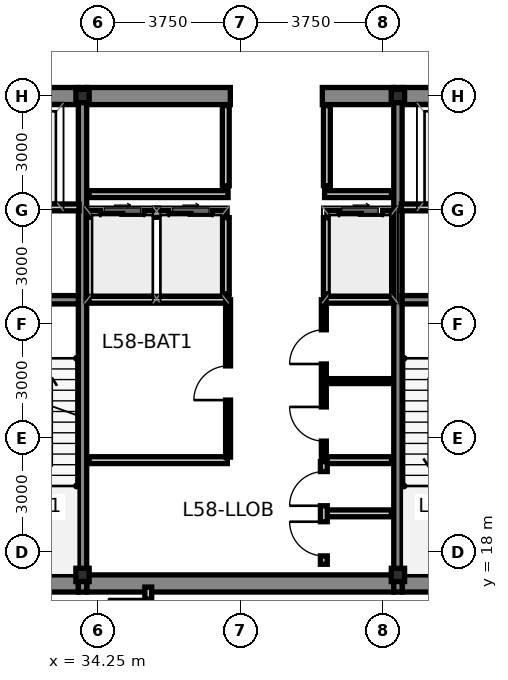
"""IFC4 building model, lengths in metres.
Left out: names, types, materials, properties, quantities, classifications, styles, units other than length and angle.
Written with IfcOpenShell. Run it as: python <this file> out.ifc"""

import sys

from ifc_helpers import new_model, si_unit, direction, frame, frame_2d, origin, origin_2d, place, context, subcontext, project, spatial, rectangle, hollow_rectangle, extrude, source, transform, mapped, element, fill, save


model = new_model("IFC4")
c1 = context("Model", 3, precision=1e-05, world=origin(), true_north=direction((0.0, 1.0)))
c2 = subcontext(c1, "Body", "Model", "MODEL_VIEW")
j1 = project(units=[si_unit("LENGTHUNIT", "METRE"), si_unit("PLANEANGLEUNIT", "RADIAN")], contexts=[c1])
p1 = place(None, origin())
s1 = spatial("IfcSite", under=j1, at=p1, CompositionType="ELEMENT")
p2 = place(p1, origin())
s2 = spatial("IfcBuilding", under=s1, at=p2, CompositionType="ELEMENT")
p3 = place(p2, frame((0.0, 0.0, 220.55)))
s3 = spatial("IfcBuildingStorey", under=s2, at=p3, CompositionType="ELEMENT", Elevation=220.55)
m1 = source(origin(), c2, "Body", "SweptSolid", [
    extrude(hollow_rectangle(XDim=0.35, YDim=0.35, WallThickness=0.016, at=origin_2d()), origin(), (0.0, 0.0, 1.0), 4.8),
])
for number, where, z_axis, x_axis in (
    (1, (33.85, 17.4, 0.0), (0.0, 0.0, 1.0), (1.0, 0.0, 0.0)),
    (2, (42.15, 17.4, 0.0), (0.0, 0.0, 1.0), (1.0, 0.0, 0.0)),
    (3, (33.85, 30.0, 0.0), (0.0, 0.0, 1.0), (1.0, 0.0, 0.0)),
    (4, (42.15, 30.0, 0.0), (0.0, 0.0, 1.0), (1.0, 0.0, 0.0)),
):
    element("IfcColumn", number, at=place(p3, frame(where, z_axis=z_axis, x_axis=x_axis)), inside=s3, PredefinedType="COLUMN", context=c2, shape_type="MappedRepresentation", body=[
        mapped(m1, transform((0.0, 0.0, 0.0), scale=1.0)),
    ])
p4 = place(p3, frame((30.84, 17.175, 0.0), z_axis=(0.0, 0.0, 1.0), x_axis=(1.0, 0.0, 0.0)))
e5 = element("IfcWall", 5, at=p4, inside=s3, PredefinedType="SHEAR", context=c2, shape_type="SweptSolid", body=[
    extrude(rectangle(XDim=2.9, YDim=0.45, at=frame_2d((1.45, 0.0))), origin(), (0.0, 0.0, 1.0), 4.8),
])
p5 = place(p3, frame((33.96, 17.175, 0.0), z_axis=(0.0, 0.0, 1.0), x_axis=(1.0, 0.0, 0.0)))
e6 = element("IfcWall", 6, at=p5, inside=s3, PredefinedType="SHEAR", context=c2, shape_type="SweptSolid", body=[
    extrude(rectangle(XDim=8.08, YDim=0.45, at=frame_2d((4.04, 0.0))), origin(), (0.0, 0.0, 1.0), 4.8),
])
for number, where, z_axis, x_axis in (
    (7, (42.26, 17.175, 0.0), (0.0, 0.0, 1.0), (1.0, 0.0, 0.0)),
    (8, (30.84, 30.0, 0.0), (0.0, 0.0, 1.0), (1.0, 0.0, 0.0)),
):
    element("IfcWall", number, at=place(p3, frame(where, z_axis=z_axis, x_axis=x_axis)), inside=s3, PredefinedType="SHEAR", context=c2, shape_type="SweptSolid", body=[
        extrude(rectangle(XDim=2.9, YDim=0.45, at=frame_2d((1.45, 0.0))), origin(), (0.0, 0.0, 1.0), 4.8),
    ])
p6 = place(p3, frame((33.96, 30.0, 0.0), z_axis=(0.0, 0.0, 1.0), x_axis=(1.0, 0.0, 0.0)))
e9 = element("IfcWall", 9, at=p6, inside=s3, PredefinedType="SHEAR", context=c2, shape_type="SweptSolid", body=[
    extrude(rectangle(XDim=3.78, YDim=0.45, at=frame_2d((1.89, 0.0))), origin(), (0.0, 0.0, 1.0), 4.8),
])
p7 = place(p3, frame((40.16, 30.0, 0.0), z_axis=(0.0, 0.0, 1.0), x_axis=(1.0, 0.0, 0.0)))
e10 = element("IfcWall", 10, at=p7, inside=s3, PredefinedType="SHEAR", context=c2, shape_type="SweptSolid", body=[
    extrude(rectangle(XDim=1.88, YDim=0.45, at=frame_2d((0.94, 0.0))), origin(), (0.0, 0.0, 1.0), 4.8),
])
p8 = place(p3, frame((42.26, 30.0, 0.0), z_axis=(0.0, 0.0, 1.0), x_axis=(1.0, 0.0, 0.0)))
e11 = element("IfcWall", 11, at=p8, inside=s3, PredefinedType="SHEAR", context=c2, shape_type="SweptSolid", body=[
    extrude(rectangle(XDim=2.9, YDim=0.45, at=frame_2d((1.45, 0.0))), origin(), (0.0, 0.0, 1.0), 4.8),
])
for number, where, z_axis, x_axis in (
    (12, (33.85, 16.95, 0.0), (0.0, 0.0, 1.0), (0.0, 1.0, 0.0)),
    (13, (42.15, 16.95, 0.0), (0.0, 0.0, 1.0), (0.0, 1.0, 0.0)),
):
    element("IfcWall", number, at=place(p3, frame(where, z_axis=z_axis, x_axis=x_axis)), inside=s3, PredefinedType="SHEAR", context=c2, shape_type="SweptSolid", body=[
        extrude(rectangle(XDim=13.275, YDim=0.22, at=frame_2d((6.638, 0.0))), origin(), (0.0, 0.0, 1.0), 4.8),
    ])
for number, where, z_axis, x_axis in (
    (14, (30.84, 24.64, 0.0), (0.0, 0.0, 1.0), (1.0, 0.0, 0.0)),
    (15, (42.26, 24.64, 0.0), (0.0, 0.0, 1.0), (1.0, 0.0, 0.0)),
):
    element("IfcWall", number, at=place(p3, frame(where, z_axis=z_axis, x_axis=x_axis)), inside=s3, PredefinedType="SHEAR", context=c2, shape_type="SweptSolid", body=[
        extrude(rectangle(XDim=2.9, YDim=0.22, at=frame_2d((1.45, 0.0))), origin(), (0.0, 0.0, 1.0), 4.8),
    ])
p9 = place(p3, frame((34.02, 26.9, 0.0), z_axis=(0.0, 0.0, 1.0), x_axis=(1.0, 0.0, 0.0)))
e16 = element("IfcWall", 16, at=p9, inside=s3, PredefinedType="PARTITIONING", context=c2, shape_type="SweptSolid", body=[
    extrude(rectangle(XDim=3.6, YDim=0.18, at=frame_2d((1.8, 0.0))), origin(), (0.0, 0.0, 1.0), 4.55),
])
p10 = place(p9, frame((0.3, 0.0, 0.0)))
e17 = element("IfcOpeningElement", 17, at=p10, cuts=e16, PredefinedType="OPENING", context=c2, shape_type="SweptSolid", body=[
    extrude(rectangle(XDim=1.15, YDim=2.2, at=frame_2d((0.575, 1.1))), frame((0.0, 0.102, 0.0), z_axis=(0.0, -1.0, 0.0), x_axis=(1.0, 0.0, 0.0)), (0.0, 0.0, 1.0), 0.204),
])
p11 = place(p9, frame((2.1, 0.0, 0.0)))
e18 = element("IfcOpeningElement", 18, at=p11, cuts=e16, PredefinedType="OPENING", context=c2, shape_type="SweptSolid", body=[
    extrude(rectangle(XDim=1.15, YDim=2.2, at=frame_2d((0.575, 1.1))), frame((0.0, 0.102, 0.0), z_axis=(0.0, -1.0, 0.0), x_axis=(1.0, 0.0, 0.0)), (0.0, 0.0, 1.0), 0.204),
])
p12 = place(p3, frame((40.28, 26.9, 0.0), z_axis=(0.0, 0.0, 1.0), x_axis=(1.0, 0.0, 0.0)))
e19 = element("IfcWall", 19, at=p12, inside=s3, PredefinedType="PARTITIONING", context=c2, shape_type="SweptSolid", body=[
    extrude(rectangle(XDim=1.7, YDim=0.18, at=frame_2d((0.85, 0.0))), origin(), (0.0, 0.0, 1.0), 4.55),
])
p13 = place(p12, frame((0.32, 0.0, 0.0)))
e20 = element("IfcOpeningElement", 20, at=p13, cuts=e19, PredefinedType="OPENING", context=c2, shape_type="SweptSolid", body=[
    extrude(rectangle(XDim=1.15, YDim=2.2, at=frame_2d((0.575, 1.1))), frame((0.0, 0.102, 0.0), z_axis=(0.0, -1.0, 0.0), x_axis=(1.0, 0.0, 0.0)), (0.0, 0.0, 1.0), 0.204),
])
for number, where, z_axis, x_axis in (
    (21, (37.62, 24.8, 0.0), (0.0, 0.0, 1.0), (0.0, 1.0, 0.0)),
    (22, (40.28, 24.8, 0.0), (0.0, 0.0, 1.0), (0.0, 1.0, 0.0)),
):
    element("IfcWall", number, at=place(p3, frame(where, z_axis=z_axis, x_axis=x_axis)), inside=s3, PredefinedType="PARTITIONING", context=c2, shape_type="SweptSolid", body=[
        extrude(rectangle(XDim=2.0, YDim=0.18, at=frame_2d((1.0, 0.0))), origin(), (0.0, 0.0, 1.0), 4.55),
    ])
p14 = place(p3, frame((34.02, 24.64, 0.0), z_axis=(0.0, 0.0, 1.0), x_axis=(1.0, 0.0, 0.0)))
e23 = element("IfcWall", 23, at=p14, inside=s3, PredefinedType="PARTITIONING", context=c2, shape_type="SweptSolid", body=[
    extrude(rectangle(XDim=3.68, YDim=0.18, at=frame_2d((1.84, 0.0))), origin(), (0.0, 0.0, 1.0), 4.55),
])
p15 = place(p3, frame((40.2, 24.64, 0.0), z_axis=(0.0, 0.0, 1.0), x_axis=(1.0, 0.0, 0.0)))
e24 = element("IfcWall", 24, at=p15, inside=s3, PredefinedType="PARTITIONING", context=c2, shape_type="SweptSolid", body=[
    extrude(rectangle(XDim=1.78, YDim=0.18, at=frame_2d((0.89, 0.0))), origin(), (0.0, 0.0, 1.0), 4.55),
])
p16 = place(p3, frame((34.02, 27.42, 0.0), z_axis=(0.0, 0.0, 1.0), x_axis=(1.0, 0.0, 0.0)))
e25 = element("IfcWall", 25, at=p16, inside=s3, PredefinedType="PARTITIONING", context=c2, shape_type="SweptSolid", body=[
    extrude(rectangle(XDim=3.66, YDim=0.18, at=frame_2d((1.83, 0.0))), origin(), (0.0, 0.0, 1.0), 4.55),
])
p17 = place(p3, frame((40.22, 27.42, 0.0), z_axis=(0.0, 0.0, 1.0), x_axis=(1.0, 0.0, 0.0)))
e26 = element("IfcWall", 26, at=p17, inside=s3, PredefinedType="PARTITIONING", context=c2, shape_type="SweptSolid", body=[
    extrude(rectangle(XDim=1.76, YDim=0.18, at=frame_2d((0.88, 0.0))), origin(), (0.0, 0.0, 1.0), 4.55),
])
for number, where, z_axis, x_axis in (
    (27, (37.62, 27.64, 0.0), (0.0, 0.0, 1.0), (0.0, 1.0, 0.0)),
    (28, (40.28, 27.64, 0.0), (0.0, 0.0, 1.0), (0.0, 1.0, 0.0)),
):
    element("IfcWall", number, at=place(p3, frame(where, z_axis=z_axis, x_axis=x_axis)), inside=s3, PredefinedType="PARTITIONING", context=c2, shape_type="SweptSolid", body=[
        extrude(rectangle(XDim=2.11, YDim=0.18, at=frame_2d((1.055, 0.0))), origin(), (0.0, 0.0, 1.0), 4.55),
    ])
for number, where, z_axis, x_axis in (
    (29, (30.86, 27.07, 0.0), (0.0, 0.0, 1.0), (1.0, 0.0, 0.0)),
    (30, (42.24, 27.07, 0.0), (0.0, 0.0, 1.0), (1.0, 0.0, 0.0)),
):
    element("IfcWall", number, at=place(p3, frame(where, z_axis=z_axis, x_axis=x_axis)), inside=s3, PredefinedType="PARTITIONING", context=c2, shape_type="SweptSolid", body=[
        extrude(rectangle(XDim=2.9, YDim=0.18, at=frame_2d((1.45, 0.0))), origin(), (0.0, 0.0, 1.0), 4.55),
    ])
p18 = place(p3, frame((34.02, 20.42, 0.0), z_axis=(0.0, 0.0, 1.0), x_axis=(1.0, 0.0, 0.0)))
e31 = element("IfcWall", 31, at=p18, inside=s3, PredefinedType="PARTITIONING", context=c2, shape_type="SweptSolid", body=[
    extrude(rectangle(XDim=3.64, YDim=0.18, at=frame_2d((1.82, 0.0))), origin(), (0.0, 0.0, 1.0), 4.55),
])
p19 = place(p3, frame((40.22, 20.42, 0.0), z_axis=(0.0, 0.0, 1.0), x_axis=(1.0, 0.0, 0.0)))
e32 = element("IfcWall", 32, at=p19, inside=s3, PredefinedType="PARTITIONING", context=c2, shape_type="SweptSolid", body=[
    extrude(rectangle(XDim=1.76, YDim=0.18, at=frame_2d((0.88, 0.0))), origin(), (0.0, 0.0, 1.0), 4.55),
])
p20 = place(p3, frame((40.28, 22.5, 0.0), z_axis=(0.0, 0.0, 1.0), x_axis=(1.0, 0.0, 0.0)))
e33 = element("IfcWall", 33, at=p20, inside=s3, PredefinedType="PARTITIONING", context=c2, shape_type="SweptSolid", body=[
    extrude(rectangle(XDim=1.7, YDim=0.13, at=frame_2d((0.85, 0.0))), origin(), (0.0, 0.0, 1.0), 4.55),
])
p21 = place(p3, frame((37.68, 20.5, 0.0), z_axis=(0.0, 0.0, 1.0), x_axis=(0.0, 1.0, 0.0)))
e34 = element("IfcWall", 34, at=p21, inside=s3, PredefinedType="PARTITIONING", context=c2, shape_type="SweptSolid", body=[
    extrude(rectangle(XDim=4.14, YDim=0.13, at=frame_2d((2.07, 0.0))), origin(), (0.0, 0.0, 1.0), 4.55),
])
p22 = place(p21, frame((1.5, 0.0, 0.0)))
e35 = element("IfcOpeningElement", 35, at=p22, cuts=e34, PredefinedType="OPENING", context=c2, shape_type="SweptSolid", body=[
    extrude(rectangle(XDim=0.9, YDim=2.1, at=frame_2d((0.45, 1.05))), frame((0.0, 0.077, 0.0), z_axis=(0.0, -1.0, 0.0), x_axis=(1.0, 0.0, 0.0)), (0.0, 0.0, 1.0), 0.154),
])
p23 = place(p3, frame((40.2, 20.5, 0.0), z_axis=(0.0, 0.0, 1.0), x_axis=(0.0, 1.0, 0.0)))
e36 = element("IfcWall", 36, at=p23, inside=s3, PredefinedType="PARTITIONING", context=c2, shape_type="SweptSolid", body=[
    extrude(rectangle(XDim=4.14, YDim=0.13, at=frame_2d((2.07, 0.0))), origin(), (0.0, 0.0, 1.0), 4.55),
])
p24 = place(p23, frame((0.42, 0.0, 0.0)))
e37 = element("IfcOpeningElement", 37, at=p24, cuts=e36, PredefinedType="OPENING", context=c2, shape_type="SweptSolid", body=[
    extrude(rectangle(XDim=0.9, YDim=2.1, at=frame_2d((0.45, 1.05))), frame((0.0, 0.077, 0.0), z_axis=(0.0, -1.0, 0.0), x_axis=(1.0, 0.0, 0.0)), (0.0, 0.0, 1.0), 0.154),
])
p25 = place(p23, frame((2.45, 0.0, 0.0)))
e38 = element("IfcOpeningElement", 38, at=p25, cuts=e36, PredefinedType="OPENING", context=c2, shape_type="SweptSolid", body=[
    extrude(rectangle(XDim=0.9, YDim=2.1, at=frame_2d((0.45, 1.05))), frame((0.0, 0.077, 0.0), z_axis=(0.0, -1.0, 0.0), x_axis=(1.0, 0.0, 0.0)), (0.0, 0.0, 1.0), 0.154),
])
p26 = place(p3, frame((40.28, 19.02, 0.0), z_axis=(0.0, 0.0, 1.0), x_axis=(1.0, 0.0, 0.0)))
e39 = element("IfcWall", 39, at=p26, inside=s3, PredefinedType="PARTITIONING", context=c2, shape_type="SweptSolid", body=[
    extrude(rectangle(XDim=1.7, YDim=0.18, at=frame_2d((0.85, 0.0))), origin(), (0.0, 0.0, 1.0), 4.55),
])
p27 = place(p3, frame((40.2, 17.68, 0.0), z_axis=(0.0, 0.0, 1.0), x_axis=(0.0, 1.0, 0.0)))
e40 = element("IfcWall", 40, at=p27, inside=s3, PredefinedType="PARTITIONING", context=c2, shape_type="SweptSolid", body=[
    extrude(rectangle(XDim=2.7, YDim=0.18, at=frame_2d((1.35, 0.0))), origin(), (0.0, 0.0, 1.0), 4.55),
])
p28 = place(p27, frame((0.22, 0.0, 0.0)))
e41 = element("IfcOpeningElement", 41, at=p28, cuts=e40, PredefinedType="OPENING", context=c2, shape_type="SweptSolid", body=[
    extrude(rectangle(XDim=0.9, YDim=2.1, at=frame_2d((0.45, 1.05))), frame((0.0, 0.102, 0.0), z_axis=(0.0, -1.0, 0.0), x_axis=(1.0, 0.0, 0.0)), (0.0, 0.0, 1.0), 0.204),
])
p29 = place(p27, frame((1.54, 0.0, 0.0)))
e42 = element("IfcOpeningElement", 42, at=p29, cuts=e40, PredefinedType="OPENING", context=c2, shape_type="SweptSolid", body=[
    extrude(rectangle(XDim=0.9, YDim=2.1, at=frame_2d((0.45, 1.05))), frame((0.0, 0.102, 0.0), z_axis=(0.0, -1.0, 0.0), x_axis=(1.0, 0.0, 0.0)), (0.0, 0.0, 1.0), 0.204),
])
p30 = place(p3, frame((35.58, 15.465, 0.0), z_axis=(0.0, 0.0, 1.0), x_axis=(0.0, 1.0, 0.0)))
e43 = element("IfcWall", 43, at=p30, inside=s3, PredefinedType="PARTITIONING", context=c2, shape_type="SweptSolid", body=[
    extrude(rectangle(XDim=1.615, YDim=0.18, at=frame_2d((0.808, 0.0))), origin(), (0.0, 0.0, 1.0), 4.55),
])
p31 = place(p30, frame((0.25, 0.0, 0.0)))
e44 = element("IfcOpeningElement", 44, at=p31, cuts=e43, PredefinedType="OPENING", context=c2, shape_type="SweptSolid", body=[
    extrude(rectangle(XDim=1.05, YDim=2.15, at=frame_2d((0.525, 1.075))), frame((0.0, 0.102, 0.0), z_axis=(0.0, -1.0, 0.0), x_axis=(1.0, 0.0, 0.0)), (0.0, 0.0, 1.0), 0.204),
])
p32 = place(p10, origin())
e45 = element("IfcDoor", 45, at=p32, inside=s3, OperationType="SLIDING_TO_LEFT", PredefinedType="DOOR", context=c2, shape_type="SweptSolid", body=[
    extrude(rectangle(XDim=1.15, YDim=2.2, at=frame_2d((0.575, 1.1))), frame((0.0, 0.025, 0.0), z_axis=(0.0, -1.0, 0.0), x_axis=(1.0, 0.0, 0.0)), (0.0, 0.0, 1.0), 0.05),
])
fill(e17, e45)
p33 = place(p11, origin())
e46 = element("IfcDoor", 46, at=p33, inside=s3, OperationType="SLIDING_TO_RIGHT", PredefinedType="DOOR", context=c2, shape_type="SweptSolid", body=[
    extrude(rectangle(XDim=1.15, YDim=2.2, at=frame_2d((0.575, 1.1))), frame((0.0, 0.025, 0.0), z_axis=(0.0, -1.0, 0.0), x_axis=(1.0, 0.0, 0.0)), (0.0, 0.0, 1.0), 0.05),
])
fill(e18, e46)
p34 = place(p13, origin())
e47 = element("IfcDoor", 47, at=p34, inside=s3, OperationType="SLIDING_TO_LEFT", PredefinedType="DOOR", context=c2, shape_type="SweptSolid", body=[
    extrude(rectangle(XDim=1.15, YDim=2.2, at=frame_2d((0.575, 1.1))), frame((0.0, 0.025, 0.0), z_axis=(0.0, -1.0, 0.0), x_axis=(1.0, 0.0, 0.0)), (0.0, 0.0, 1.0), 0.05),
])
fill(e20, e47)
p35 = place(p22, origin())
e48 = element("IfcDoor", 48, at=p35, inside=s3, OperationType="SINGLE_SWING_LEFT", PredefinedType="DOOR", context=c2, shape_type="SweptSolid", body=[
    extrude(rectangle(XDim=0.9, YDim=2.1, at=frame_2d((0.45, 1.05))), frame((0.0, 0.025, 0.0), z_axis=(0.0, -1.0, 0.0), x_axis=(1.0, 0.0, 0.0)), (0.0, 0.0, 1.0), 0.05),
])
fill(e35, e48)
p36 = place(p24, origin())
e49 = element("IfcDoor", 49, at=p36, inside=s3, OperationType="SINGLE_SWING_RIGHT", PredefinedType="DOOR", context=c2, shape_type="SweptSolid", body=[
    extrude(rectangle(XDim=0.9, YDim=2.1, at=frame_2d((0.45, 1.05))), frame((0.0, 0.025, 0.0), z_axis=(0.0, -1.0, 0.0), x_axis=(1.0, 0.0, 0.0)), (0.0, 0.0, 1.0), 0.05),
])
fill(e37, e49)
p37 = place(p25, origin())
e50 = element("IfcDoor", 50, at=p37, inside=s3, OperationType="SINGLE_SWING_LEFT", PredefinedType="DOOR", context=c2, shape_type="SweptSolid", body=[
    extrude(rectangle(XDim=0.9, YDim=2.1, at=frame_2d((0.45, 1.05))), frame((0.0, 0.025, 0.0), z_axis=(0.0, -1.0, 0.0), x_axis=(1.0, 0.0, 0.0)), (0.0, 0.0, 1.0), 0.05),
])
fill(e38, e50)
p38 = place(p28, origin())
e51 = element("IfcDoor", 51, at=p38, inside=s3, OperationType="SINGLE_SWING_RIGHT", PredefinedType="DOOR", context=c2, shape_type="SweptSolid", body=[
    extrude(rectangle(XDim=0.9, YDim=2.1, at=frame_2d((0.45, 1.05))), frame((0.0, 0.025, 0.0), z_axis=(0.0, -1.0, 0.0), x_axis=(1.0, 0.0, 0.0)), (0.0, 0.0, 1.0), 0.05),
])
fill(e41, e51)
p39 = place(p29, origin())
e52 = element("IfcDoor", 52, at=p39, inside=s3, OperationType="SINGLE_SWING_LEFT", PredefinedType="DOOR", context=c2, shape_type="SweptSolid", body=[
    extrude(rectangle(XDim=0.9, YDim=2.1, at=frame_2d((0.45, 1.05))), frame((0.0, 0.025, 0.0), z_axis=(0.0, -1.0, 0.0), x_axis=(1.0, 0.0, 0.0)), (0.0, 0.0, 1.0), 0.05),
])
fill(e42, e52)
p40 = place(p31, origin())
e53 = element("IfcDoor", 53, at=p40, inside=s3, OperationType="SINGLE_SWING_RIGHT", PredefinedType="DOOR", context=c2, shape_type="SweptSolid", body=[
    extrude(rectangle(XDim=1.05, YDim=2.15, at=frame_2d((0.525, 1.075))), frame((0.0, 0.025, 0.0), z_axis=(0.0, -1.0, 0.0), x_axis=(1.0, 0.0, 0.0)), (0.0, 0.0, 1.0), 0.05),
])
fill(e44, e53)
save(model, sys.argv[1])
